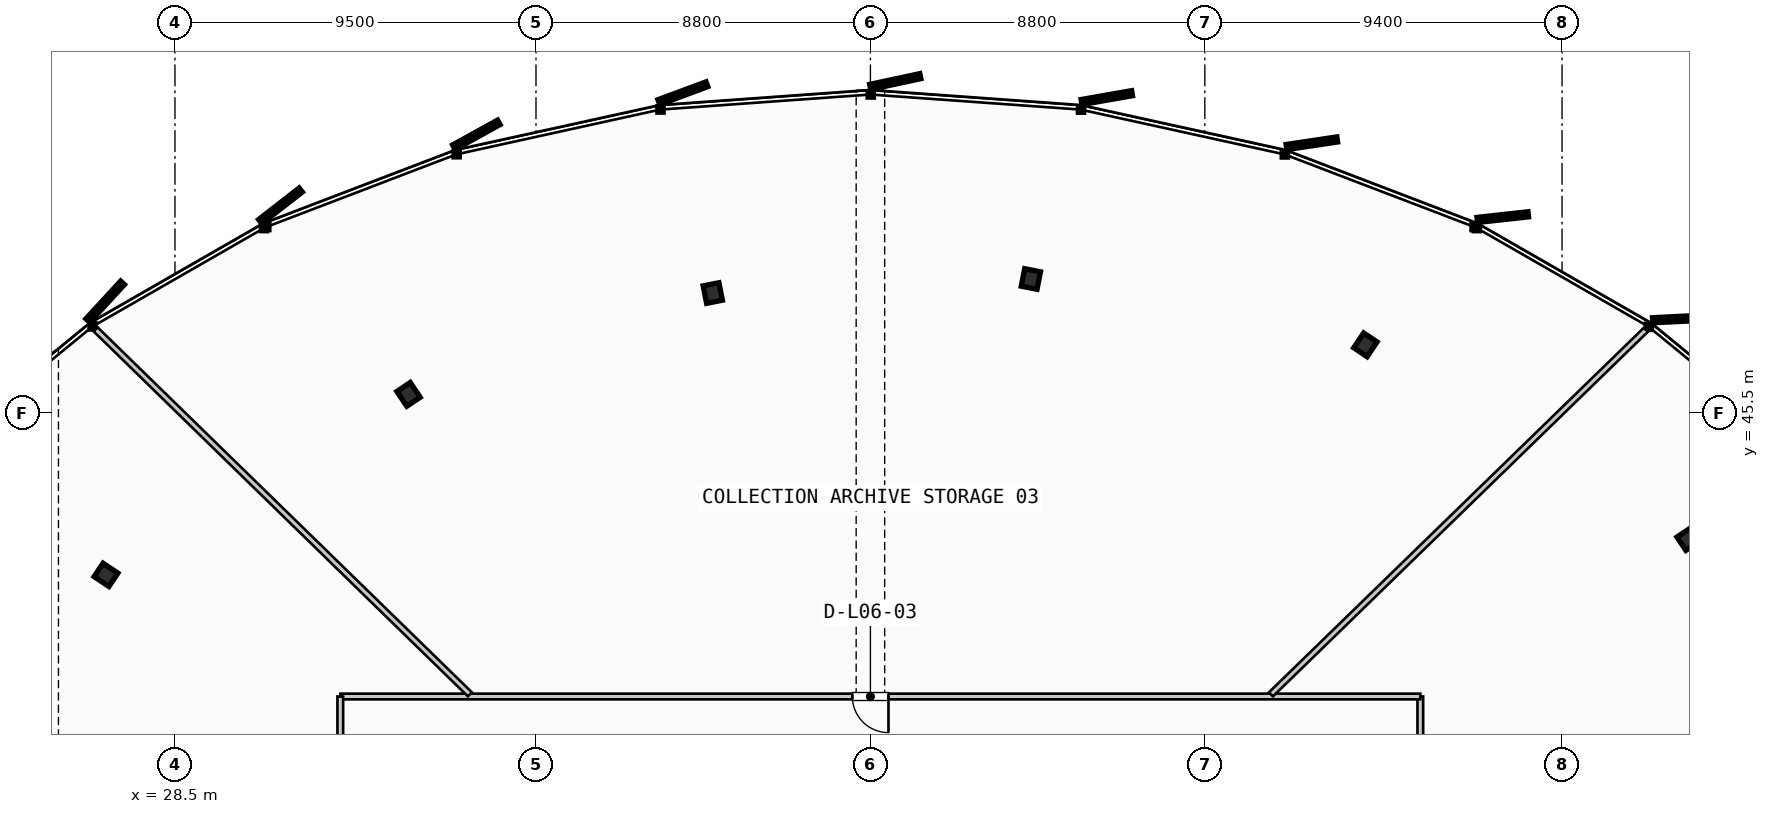
"""IFC4 building model, lengths in metres.
Left out: names, types, materials, properties, quantities, classifications, styles, units other than length and angle.
Written with IfcOpenShell. Run it as: python <this file> out.ifc"""

import sys

from ifc_helpers import new_model, si_unit, direction, frame, frame_2d, origin, origin_2d, place, context, subcontext, project, spatial, rectangle, i_section, extrude, source, transform, mapped, element, fill, save


model = new_model("IFC4")
c1 = context("Model", 3, precision=1e-05, world=origin(), true_north=direction((0.0, 1.0)))
c2 = subcontext(c1, "Body", "Model", "MODEL_VIEW")
j1 = project(units=[si_unit("LENGTHUNIT", "METRE"), si_unit("PLANEANGLEUNIT", "RADIAN")], contexts=[c1])
p1 = place(None, origin())
s1 = spatial("IfcSite", under=j1, at=p1, CompositionType="ELEMENT")
p2 = place(p1, origin())
s2 = spatial("IfcBuilding", under=s1, at=p2, CompositionType="ELEMENT")
p3 = place(p2, frame((0.0, 0.0, 29.6)))
s3 = spatial("IfcBuildingStorey", under=s2, at=p3, CompositionType="ELEMENT", Elevation=29.6)
m1 = source(origin(), c2, "Body", "SweptSolid", [
    extrude(i_section(OverallWidth=0.423, OverallDepth=0.469, WebThickness=0.051, FlangeThickness=0.081, FilletRadius=0.015, at=origin_2d()), origin(), (0.0, 0.0, 1.0), 3.55),
])
for number, where, z_axis, x_axis in (
    (1, (68.336, 42.19, 0.0), (0.0, 0.0, 1.0), (0.831, 0.556, 0.0)),
    (2, (59.825, 47.293, 0.0), (0.0, 0.0, 1.0), (0.556, 0.831, 0.0)),
    (3, (51.022, 49.026, 0.0), (0.0, 0.0, 1.0), (0.195, 0.981, 0.0)),
    (4, (42.652, 48.656, 0.0), (0.0, 0.0, 1.0), (-0.195, 0.981, 0.0)),
    (5, (34.646, 45.99, 0.0), (0.0, 0.0, 1.0), (-0.556, 0.831, 0.0)),
    (6, (26.685, 41.241, 0.0), (0.0, 0.0, 1.0), (-0.831, 0.556, 0.0)),
):
    element("IfcColumn", number, at=place(p3, frame(where, z_axis=z_axis, x_axis=x_axis)), inside=s3, PredefinedType="COLUMN", context=c2, shape_type="MappedRepresentation", body=[
        mapped(m1, transform((0.0, 0.0, 0.0), scale=1.0)),
    ])
p4 = place(p3, frame((61.27, 17.98, 0.0), z_axis=(0.0, 0.0, 1.0), x_axis=(0.0, 1.0, 0.0)))
e7 = element("IfcWall", 7, at=p4, inside=s3, PredefinedType="PARTITIONING", context=c2, shape_type="SweptSolid", body=[
    extrude(rectangle(XDim=20.06, YDim=0.15, at=frame_2d((10.03, 0.0))), origin(), (0.0, 0.0, 1.0), 2.925),
])
p5 = place(p4, frame((10.736, 0.0, 0.0)))
e8 = element("IfcOpeningElement", 8, at=p5, cuts=e7, PredefinedType="OPENING", context=c2, shape_type="SweptSolid", body=[
    extrude(rectangle(XDim=0.95, YDim=2.15, at=frame_2d((0.475, 1.075))), frame((0.0, 0.085, 0.0), z_axis=(0.0, -1.0, 0.0), x_axis=(1.0, 0.0, 0.0)), (0.0, 0.0, 1.0), 0.17),
])
p6 = place(p3, frame((61.27, 38.04, 0.0), z_axis=(0.0, 0.0, 1.0), x_axis=(-1.0, 0.0, 0.0)))
e9 = element("IfcWall", 9, at=p6, inside=s3, PredefinedType="PARTITIONING", context=c2, shape_type="SweptSolid", body=[
    extrude(rectangle(XDim=28.42, YDim=0.15, at=frame_2d((14.21, 0.0))), origin(), (0.0, 0.0, 1.0), 2.925),
])
p7 = place(p6, frame((13.995, 0.0, 0.0)))
e10 = element("IfcOpeningElement", 10, at=p7, cuts=e9, PredefinedType="OPENING", context=c2, shape_type="SweptSolid", body=[
    extrude(rectangle(XDim=0.95, YDim=2.15, at=frame_2d((0.475, 1.075))), frame((0.0, 0.085, 0.0), z_axis=(0.0, -1.0, 0.0), x_axis=(1.0, 0.0, 0.0)), (0.0, 0.0, 1.0), 0.17),
])
p8 = place(p3, frame((32.85, 38.04, 0.0), z_axis=(0.0, 0.0, 1.0), x_axis=(0.0, -1.0, 0.0)))
e11 = element("IfcWall", 11, at=p8, inside=s3, PredefinedType="PARTITIONING", context=c2, shape_type="SweptSolid", body=[
    extrude(rectangle(XDim=20.06, YDim=0.15, at=frame_2d((10.03, 0.0))), origin(), (0.0, 0.0, 1.0), 2.925),
])
p9 = place(p8, frame((9.555, 0.0, 0.0)))
e12 = element("IfcOpeningElement", 12, at=p9, cuts=e11, PredefinedType="OPENING", context=c2, shape_type="SweptSolid", body=[
    extrude(rectangle(XDim=0.95, YDim=2.15, at=frame_2d((0.475, 1.075))), frame((0.0, 0.085, 0.0), z_axis=(0.0, -1.0, 0.0), x_axis=(1.0, 0.0, 0.0)), (0.0, 0.0, 1.0), 0.17),
])
p10 = place(p3, frame((57.339, 38.096, 0.0), z_axis=(0.0, 0.0, 1.0), x_axis=(0.71692792253, 0.697147297131, 0.0)))
e13 = element("IfcWall", 13, at=p10, inside=s3, PredefinedType="PARTITIONING", context=c2, shape_type="SweptSolid", body=[
    extrude(rectangle(XDim=13.762, YDim=0.15, at=frame_2d((6.881, 0.0))), origin(), (0.0, 0.0, 1.0), 2.925),
])
p11 = place(p3, frame((36.261, 38.096, 0.0), z_axis=(0.0, 0.0, 1.0), x_axis=(-0.715959114094, 0.698142211119, 0.0)))
e14 = element("IfcWall", 14, at=p11, inside=s3, PredefinedType="PARTITIONING", context=c2, shape_type="SweptSolid", body=[
    extrude(rectangle(XDim=13.758, YDim=0.15, at=frame_2d((6.879, 0.0))), origin(), (0.0, 0.0, 1.0), 2.925),
])
m2 = source(origin(), c2, "Body", "SweptSolid", [
    extrude(rectangle(XDim=0.95, YDim=2.15, at=frame_2d((0.475, 1.075))), frame((0.0, 0.025, 0.0), z_axis=(0.0, -1.0, 0.0), x_axis=(1.0, 0.0, 0.0)), (0.0, 0.0, 1.0), 0.05),
])
p12 = place(p7, origin())
e15 = element("IfcDoor", 15, at=p12, inside=s3, OperationType="SINGLE_SWING_LEFT", PredefinedType="DOOR", context=c2, shape_type="MappedRepresentation", body=[
    mapped(m2, transform((0.0, 0.0, 0.0), scale=1.0)),
])
fill(e10, e15)
save(model, sys.argv[1])
